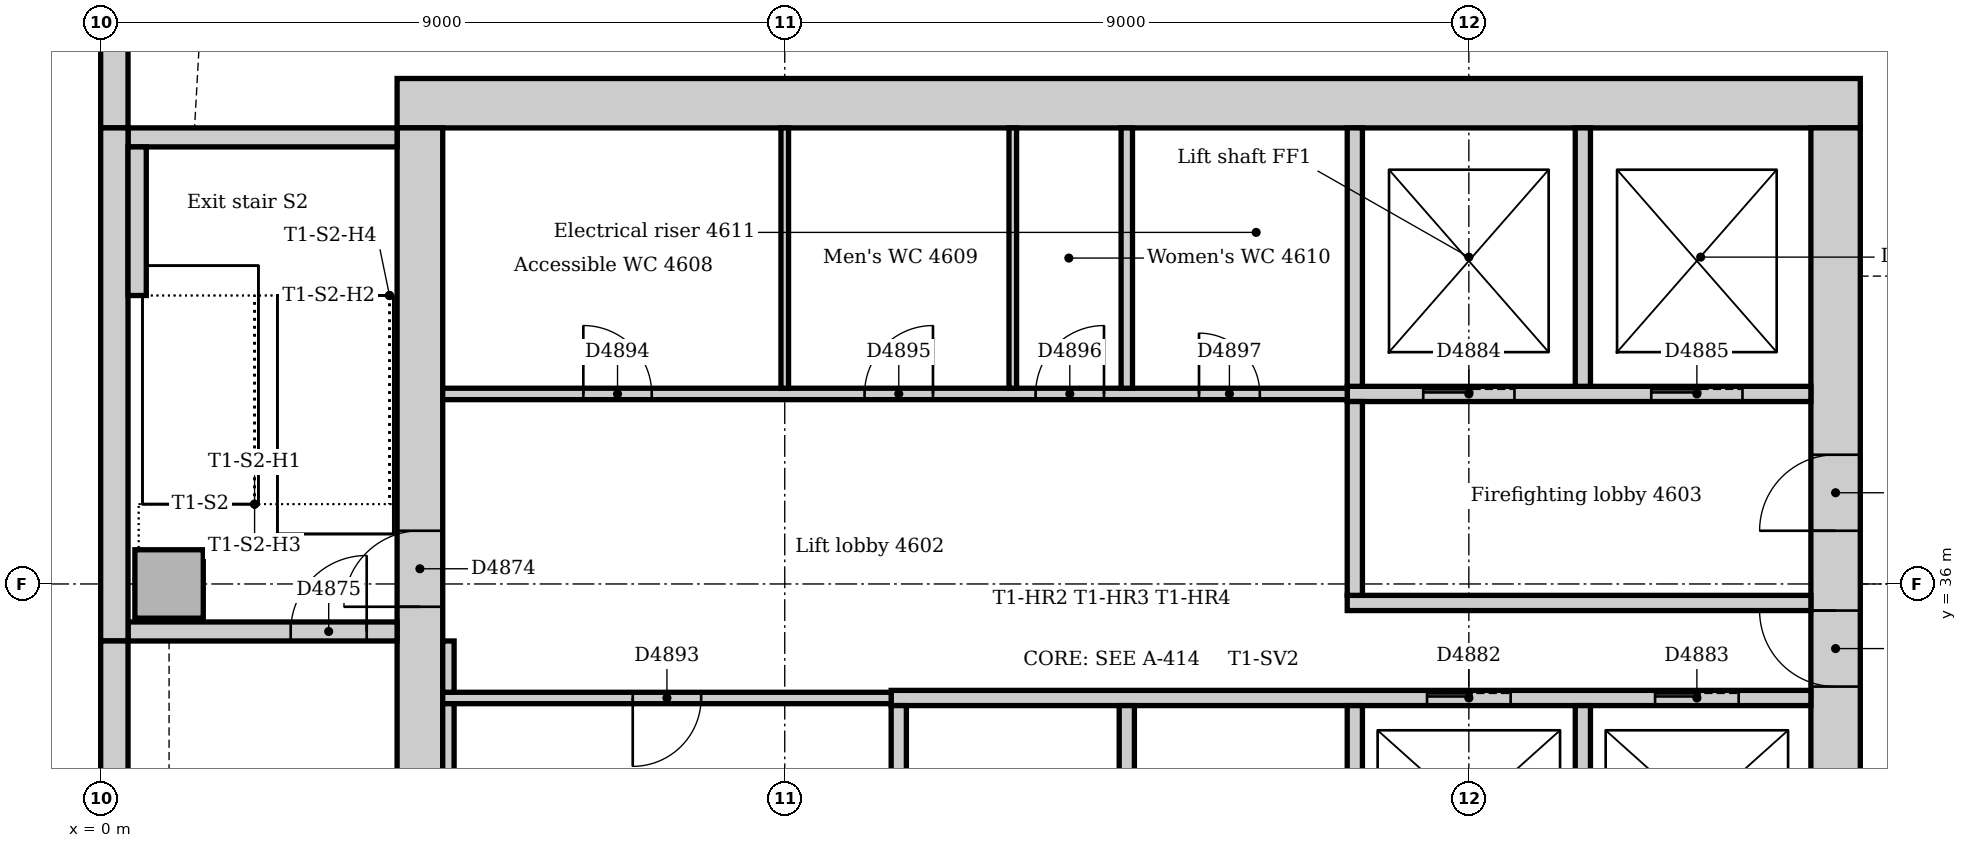
"""IFC4 building model, lengths in metres.
Left out: names, types, materials, properties, quantities, classifications, styles, units other than length and angle.
Written with IfcOpenShell. Run it as: python <this file> out.ifc"""

import sys

from ifc_helpers import new_model, si_unit, direction, frame, frame_2d, origin, origin_2d, place, context, subcontext, project, spatial, rectangle, extrude, element, fill, save


model = new_model("IFC4")
c1 = context("Model", 3, precision=1e-05, world=origin(), true_north=direction((0.0, 1.0)))
c2 = subcontext(c1, "Body", "Model", "MODEL_VIEW")
j1 = project(units=[si_unit("LENGTHUNIT", "METRE"), si_unit("PLANEANGLEUNIT", "RADIAN")], contexts=[c1])
p1 = place(None, origin())
s1 = spatial("IfcSite", under=j1, at=p1, CompositionType="ELEMENT")
p2 = place(p1, origin())
s2 = spatial("IfcBuilding", under=s1, at=p2, CompositionType="ELEMENT")
p3 = place(p2, frame((0.0, 0.0, 193.0)))
s3 = spatial("IfcBuildingStorey", under=s2, at=p3, CompositionType="ELEMENT", Elevation=193.0)
p4 = place(p3, frame((23.15, 42.325, 0.0), z_axis=(0.0, 0.0, 1.0), x_axis=(-1.0, 0.0, 0.0)))
e1 = element("IfcWall", 1, at=p4, inside=s3, PredefinedType="SOLIDWALL", context=c2, shape_type="SweptSolid", body=[
    extrude(rectangle(XDim=19.25, YDim=0.65, at=frame_2d((9.625, 0.0))), origin(), (0.0, 0.0, 1.0), 5.0),
])
p5 = place(p3, frame((22.825, 31.5, 0.0), z_axis=(0.0, 0.0, 1.0), x_axis=(0.0, 1.0, 0.0)))
e2 = element("IfcWall", 2, at=p5, inside=s3, PredefinedType="SOLIDWALL", context=c2, shape_type="SweptSolid", body=[
    extrude(rectangle(XDim=10.5, YDim=0.65, at=frame_2d((5.25, 0.0))), origin(), (0.0, 0.0, 1.0), 5.0),
])
p6 = place(p5, frame((3.15, 0.0, 0.0)))
e3 = element("IfcOpeningElement", 3, at=p6, cuts=e2, PredefinedType="OPENING", context=c2, shape_type="SweptSolid", body=[
    extrude(rectangle(XDim=1.0, YDim=2.1, at=frame_2d((0.5, 1.05))), frame((0.0, 0.335, 0.0), z_axis=(0.0, -1.0, 0.0), x_axis=(1.0, 0.0, 0.0)), (0.0, 0.0, 1.0), 0.67),
])
p7 = place(p5, frame((5.2, 0.0, 0.0)))
e4 = element("IfcOpeningElement", 4, at=p7, cuts=e2, PredefinedType="OPENING", context=c2, shape_type="SweptSolid", body=[
    extrude(rectangle(XDim=1.0, YDim=2.1, at=frame_2d((0.5, 1.05))), frame((0.0, 0.335, 0.0), z_axis=(0.0, -1.0, 0.0), x_axis=(1.0, 0.0, 0.0)), (0.0, 0.0, 1.0), 0.67),
])
p8 = place(p3, frame((4.2, 42.0, 0.0), z_axis=(0.0, 0.0, 1.0), x_axis=(0.0, -1.0, 0.0)))
e5 = element("IfcWall", 5, at=p8, inside=s3, PredefinedType="SOLIDWALL", context=c2, shape_type="SweptSolid", body=[
    extrude(rectangle(XDim=10.5, YDim=0.6, at=frame_2d((5.25, 0.0))), origin(), (0.0, 0.0, 1.0), 5.0),
])
p9 = place(p8, frame((5.3, 0.0, 0.0)))
e6 = element("IfcOpeningElement", 6, at=p9, cuts=e5, PredefinedType="OPENING", context=c2, shape_type="SweptSolid", body=[
    extrude(rectangle(XDim=1.0, YDim=2.1, at=frame_2d((0.5, 1.05))), frame((0.0, 0.31, 0.0), z_axis=(0.0, -1.0, 0.0), x_axis=(1.0, 0.0, 0.0)), (0.0, 0.0, 1.0), 0.62),
])
p10 = place(p3, frame((0.36, 35.375, 0.0), z_axis=(0.0, 0.0, 1.0), x_axis=(1.0, 0.0, 0.0)))
e7 = element("IfcWall", 7, at=p10, inside=s3, PredefinedType="SOLIDWALL", context=c2, shape_type="SweptSolid", body=[
    extrude(rectangle(XDim=3.54, YDim=0.25, at=frame_2d((1.77, 0.0))), origin(), (0.0, 0.0, 1.0), 5.0),
])
p11 = place(p10, frame((2.14, 0.0, 0.0)))
e8 = element("IfcOpeningElement", 8, at=p11, cuts=e7, PredefinedType="OPENING", context=c2, shape_type="SweptSolid", body=[
    extrude(rectangle(XDim=1.0, YDim=2.1, at=frame_2d((0.5, 1.05))), frame((0.0, 0.135, 0.0), z_axis=(0.0, -1.0, 0.0), x_axis=(1.0, 0.0, 0.0)), (0.0, 0.0, 1.0), 0.27),
])
p12 = place(p3, frame((3.9, 41.875, 0.0), z_axis=(0.0, 0.0, 1.0), x_axis=(-1.0, 0.0, 0.0)))
e9 = element("IfcWall", 9, at=p12, inside=s3, PredefinedType="SOLIDWALL", context=c2, shape_type="SweptSolid", body=[
    extrude(rectangle(XDim=3.54, YDim=0.25, at=frame_2d((1.77, 0.0))), origin(), (0.0, 0.0, 1.0), 5.0),
])
p13 = place(p3, frame((0.9, 36.0, 0.0), z_axis=(0.0, 0.0, 1.0), x_axis=(1.0, 0.0, 0.0)))
e10 = element("IfcColumn", 10, at=p13, inside=s3, PredefinedType="COLUMN", context=c2, shape_type="SweptSolid", body=[
    extrude(rectangle(XDim=0.9, YDim=0.9, at=origin_2d()), origin(), (0.0, 0.0, 1.0), 5.0),
])
p14 = place(p3, frame((0.18, 49.757, 0.0), z_axis=(0.0, 0.0, 1.0), x_axis=(0.0, -1.0, 0.0)))
e11 = element("IfcWall", 11, at=p14, inside=s3, PredefinedType="STANDARD", context=c2, shape_type="SweptSolid", body=[
    extrude(rectangle(XDim=7.757, YDim=0.36, at=frame_2d((3.879, 0.0))), origin(), (0.0, 0.0, 1.0), 4.85),
])
p15 = place(p14, frame((3.107, 0.0, 0.9)))
e12 = element("IfcOpeningElement", 12, at=p15, cuts=e11, PredefinedType="OPENING", context=c2, shape_type="SweptSolid", body=[
    extrude(rectangle(XDim=3.3, YDim=2.2, at=frame_2d((1.65, 1.1))), frame((0.0, 0.19, 0.0), z_axis=(0.0, -1.0, 0.0), x_axis=(1.0, 0.0, 0.0)), (0.0, 0.0, 1.0), 0.38),
])
p16 = place(p3, frame((0.18, 42.0, 0.0), z_axis=(0.0, 0.0, 1.0), x_axis=(0.0, -1.0, 0.0)))
e13 = element("IfcWall", 13, at=p16, inside=s3, PredefinedType="STANDARD", context=c2, shape_type="SweptSolid", body=[
    extrude(rectangle(XDim=6.75, YDim=0.36, at=frame_2d((3.375, 0.0))), origin(), (0.0, 0.0, 1.0), 4.85),
])
p17 = place(p3, frame((0.18, 35.25, 0.0), z_axis=(0.0, 0.0, 1.0), x_axis=(0.0, -1.0, 0.0)))
e14 = element("IfcWall", 14, at=p17, inside=s3, PredefinedType="STANDARD", context=c2, shape_type="SweptSolid", body=[
    extrude(rectangle(XDim=7.5, YDim=0.36, at=frame_2d((3.75, 0.0))), origin(), (0.0, 0.0, 1.0), 4.85),
])
p18 = place(p3, frame((0.48, 39.795, 0.0), z_axis=(0.0, 0.0, 1.0), x_axis=(0.0, 1.0, 0.0)))
e15 = element("IfcWall", 15, at=p18, inside=s3, PredefinedType="STANDARD", context=c2, shape_type="SweptSolid", body=[
    extrude(rectangle(XDim=1.955, YDim=0.24, at=frame_2d((0.978, 0.0))), origin(), (0.0, 0.0, 1.0), 5.0),
])
p19 = place(p3, frame((16.4, 35.75, 0.0), z_axis=(0.0, 0.0, 1.0), x_axis=(1.0, 0.0, 0.0)))
e16 = element("IfcWall", 16, at=p19, inside=s3, PredefinedType="PARTITIONING", context=c2, shape_type="SweptSolid", body=[
    extrude(rectangle(XDim=6.1, YDim=0.2, at=frame_2d((3.05, 0.0))), origin(), (0.0, 0.0, 1.0), 4.85),
])
p20 = place(p3, frame((16.4, 38.5, 0.0), z_axis=(0.0, 0.0, 1.0), x_axis=(1.0, 0.0, 0.0)))
e17 = element("IfcWall", 17, at=p20, inside=s3, PredefinedType="PARTITIONING", context=c2, shape_type="SweptSolid", body=[
    extrude(rectangle(XDim=6.1, YDim=0.2, at=frame_2d((3.05, 0.0))), origin(), (0.0, 0.0, 1.0), 4.85),
])
p21 = place(p20, frame((1.0, 0.0, 0.0)))
e18 = element("IfcOpeningElement", 18, at=p21, cuts=e17, PredefinedType="OPENING", context=c2, shape_type="SweptSolid", body=[
    extrude(rectangle(XDim=1.2, YDim=2.1, at=frame_2d((0.6, 1.05))), frame((0.0, 0.11, 0.0), z_axis=(0.0, -1.0, 0.0), x_axis=(1.0, 0.0, 0.0)), (0.0, 0.0, 1.0), 0.22),
])
p22 = place(p20, frame((4.0, 0.0, 0.0)))
e19 = element("IfcOpeningElement", 19, at=p22, cuts=e17, PredefinedType="OPENING", context=c2, shape_type="SweptSolid", body=[
    extrude(rectangle(XDim=1.2, YDim=2.1, at=frame_2d((0.6, 1.05))), frame((0.0, 0.11, 0.0), z_axis=(0.0, -1.0, 0.0), x_axis=(1.0, 0.0, 0.0)), (0.0, 0.0, 1.0), 0.22),
])
p23 = place(p3, frame((16.5, 35.85, 0.0), z_axis=(0.0, 0.0, 1.0), x_axis=(0.0, 1.0, 0.0)))
e20 = element("IfcWall", 20, at=p23, inside=s3, PredefinedType="PARTITIONING", context=c2, shape_type="SweptSolid", body=[
    extrude(rectangle(XDim=2.55, YDim=0.2, at=frame_2d((1.275, 0.0))), origin(), (0.0, 0.0, 1.0), 4.85),
])
p24 = place(p3, frame((10.4, 34.5, 0.0), z_axis=(0.0, 0.0, 1.0), x_axis=(1.0, 0.0, 0.0)))
e21 = element("IfcWall", 21, at=p24, inside=s3, PredefinedType="PARTITIONING", context=c2, shape_type="SweptSolid", body=[
    extrude(rectangle(XDim=12.1, YDim=0.2, at=frame_2d((6.05, 0.0))), origin(), (0.0, 0.0, 1.0), 4.85),
])
p25 = place(p24, frame((7.05, 0.0, 0.0)))
e22 = element("IfcOpeningElement", 22, at=p25, cuts=e21, PredefinedType="OPENING", context=c2, shape_type="SweptSolid", body=[
    extrude(rectangle(XDim=1.1, YDim=2.1, at=frame_2d((0.55, 1.05))), frame((0.0, 0.11, 0.0), z_axis=(0.0, -1.0, 0.0), x_axis=(1.0, 0.0, 0.0)), (0.0, 0.0, 1.0), 0.22),
])
p26 = place(p24, frame((10.05, 0.0, 0.0)))
e23 = element("IfcOpeningElement", 23, at=p26, cuts=e21, PredefinedType="OPENING", context=c2, shape_type="SweptSolid", body=[
    extrude(rectangle(XDim=1.1, YDim=2.1, at=frame_2d((0.55, 1.05))), frame((0.0, 0.11, 0.0), z_axis=(0.0, -1.0, 0.0), x_axis=(1.0, 0.0, 0.0)), (0.0, 0.0, 1.0), 0.22),
])
for number, where, z_axis, x_axis in (
    (24, (10.5, 31.75, 0.0), (0.0, 0.0, 1.0), (0.0, 1.0, 0.0)),
    (25, (13.5, 31.75, 0.0), (0.0, 0.0, 1.0), (0.0, 1.0, 0.0)),
    (26, (16.5, 31.75, 0.0), (0.0, 0.0, 1.0), (0.0, 1.0, 0.0)),
    (27, (19.5, 31.75, 0.0), (0.0, 0.0, 1.0), (0.0, 1.0, 0.0)),
):
    element("IfcWall", number, at=place(p3, frame(where, z_axis=z_axis, x_axis=x_axis)), inside=s3, PredefinedType="PARTITIONING", context=c2, shape_type="SweptSolid", body=[
        extrude(rectangle(XDim=2.65, YDim=0.2, at=frame_2d((1.325, 0.0))), origin(), (0.0, 0.0, 1.0), 4.85),
    ])
for number, where, z_axis, x_axis in (
    (28, (16.5, 38.6, 0.0), (0.0, 0.0, 1.0), (0.0, 1.0, 0.0)),
    (29, (19.5, 38.6, 0.0), (0.0, 0.0, 1.0), (0.0, 1.0, 0.0)),
):
    element("IfcWall", number, at=place(p3, frame(where, z_axis=z_axis, x_axis=x_axis)), inside=s3, PredefinedType="PARTITIONING", context=c2, shape_type="SweptSolid", body=[
        extrude(rectangle(XDim=3.4, YDim=0.2, at=frame_2d((1.7, 0.0))), origin(), (0.0, 0.0, 1.0), 4.85),
    ])
p27 = place(p3, frame((4.5, 38.5, 0.0), z_axis=(0.0, 0.0, 1.0), x_axis=(1.0, 0.0, 0.0)))
e30 = element("IfcWall", 30, at=p27, inside=s3, PredefinedType="PARTITIONING", context=c2, shape_type="SweptSolid", body=[
    extrude(rectangle(XDim=11.9, YDim=0.15, at=frame_2d((5.95, 0.0))), origin(), (0.0, 0.0, 1.0), 4.85),
])
p28 = place(p27, frame((1.85, 0.0, 0.0)))
e31 = element("IfcOpeningElement", 31, at=p28, cuts=e30, PredefinedType="OPENING", context=c2, shape_type="SweptSolid", body=[
    extrude(rectangle(XDim=0.9, YDim=2.1, at=frame_2d((0.45, 1.05))), frame((0.0, 0.085, 0.0), z_axis=(0.0, -1.0, 0.0), x_axis=(1.0, 0.0, 0.0)), (0.0, 0.0, 1.0), 0.17),
])
p29 = place(p27, frame((5.55, 0.0, 0.0)))
e32 = element("IfcOpeningElement", 32, at=p29, cuts=e30, PredefinedType="OPENING", context=c2, shape_type="SweptSolid", body=[
    extrude(rectangle(XDim=0.9, YDim=2.1, at=frame_2d((0.45, 1.05))), frame((0.0, 0.085, 0.0), z_axis=(0.0, -1.0, 0.0), x_axis=(1.0, 0.0, 0.0)), (0.0, 0.0, 1.0), 0.17),
])
p30 = place(p27, frame((7.8, 0.0, 0.0)))
e33 = element("IfcOpeningElement", 33, at=p30, cuts=e30, PredefinedType="OPENING", context=c2, shape_type="SweptSolid", body=[
    extrude(rectangle(XDim=0.9, YDim=2.1, at=frame_2d((0.45, 1.05))), frame((0.0, 0.085, 0.0), z_axis=(0.0, -1.0, 0.0), x_axis=(1.0, 0.0, 0.0)), (0.0, 0.0, 1.0), 0.17),
])
p31 = place(p27, frame((9.95, 0.0, 0.0)))
e34 = element("IfcOpeningElement", 34, at=p31, cuts=e30, PredefinedType="OPENING", context=c2, shape_type="SweptSolid", body=[
    extrude(rectangle(XDim=0.8, YDim=2.1, at=frame_2d((0.4, 1.05))), frame((0.0, 0.085, 0.0), z_axis=(0.0, -1.0, 0.0), x_axis=(1.0, 0.0, 0.0)), (0.0, 0.0, 1.0), 0.17),
])
p32 = place(p3, frame((4.5, 34.5, 0.0), z_axis=(0.0, 0.0, 1.0), x_axis=(1.0, 0.0, 0.0)))
e35 = element("IfcWall", 35, at=p32, inside=s3, PredefinedType="PARTITIONING", context=c2, shape_type="SweptSolid", body=[
    extrude(rectangle(XDim=5.9, YDim=0.15, at=frame_2d((2.95, 0.0))), origin(), (0.0, 0.0, 1.0), 4.85),
])
p33 = place(p32, frame((2.5, 0.0, 0.0)))
e36 = element("IfcOpeningElement", 36, at=p33, cuts=e35, PredefinedType="OPENING", context=c2, shape_type="SweptSolid", body=[
    extrude(rectangle(XDim=0.9, YDim=2.1, at=frame_2d((0.45, 1.05))), frame((0.0, 0.085, 0.0), z_axis=(0.0, -1.0, 0.0), x_axis=(1.0, 0.0, 0.0)), (0.0, 0.0, 1.0), 0.17),
])
p34 = place(p3, frame((4.575, 34.575, 0.0), z_axis=(0.0, 0.0, 1.0), x_axis=(0.0, 1.0, 0.0)))
e37 = element("IfcWall", 37, at=p34, inside=s3, PredefinedType="PARTITIONING", context=c2, shape_type="SweptSolid", body=[
    extrude(rectangle(XDim=0.675, YDim=0.15, at=frame_2d((0.338, 0.0))), origin(), (0.0, 0.0, 1.0), 4.85),
])
p35 = place(p3, frame((4.575, 31.75, 0.0), z_axis=(0.0, 0.0, 1.0), x_axis=(0.0, 1.0, 0.0)))
e38 = element("IfcWall", 38, at=p35, inside=s3, PredefinedType="PARTITIONING", context=c2, shape_type="SweptSolid", body=[
    extrude(rectangle(XDim=2.675, YDim=0.15, at=frame_2d((1.337, 0.0))), origin(), (0.0, 0.0, 1.0), 4.85),
])
p36 = place(p3, frame((13.5, 38.575, 0.0), z_axis=(0.0, 0.0, 1.0), x_axis=(0.0, 1.0, 0.0)))
e39 = element("IfcWall", 39, at=p36, inside=s3, PredefinedType="PARTITIONING", context=c2, shape_type="SweptSolid", body=[
    extrude(rectangle(XDim=3.425, YDim=0.15, at=frame_2d((1.712, 0.0))), origin(), (0.0, 0.0, 1.0), 4.85),
])
for number, where, z_axis, x_axis in (
    (40, (9.0, 38.575, 0.0), (0.0, 0.0, 1.0), (0.0, 1.0, 0.0)),
    (41, (12.0, 38.575, 0.0), (0.0, 0.0, 1.0), (0.0, 1.0, 0.0)),
):
    element("IfcWall", number, at=place(p3, frame(where, z_axis=z_axis, x_axis=x_axis)), inside=s3, PredefinedType="PARTITIONING", context=c2, shape_type="SweptSolid", body=[
        extrude(rectangle(XDim=3.425, YDim=0.1, at=frame_2d((1.712, 0.0))), origin(), (0.0, 0.0, 1.0), 4.85),
    ])
p37 = place(p9, frame((1.0, 0.0, 0.0), z_axis=(0.0, 0.0, 1.0), x_axis=(-1.0, 0.0, 0.0)))
e42 = element("IfcDoor", 42, at=p37, inside=s3, OperationType="SINGLE_SWING_LEFT", PredefinedType="DOOR", context=c2, shape_type="SweptSolid", body=[
    extrude(rectangle(XDim=1.0, YDim=2.1, at=frame_2d((0.5, 1.05))), frame((0.0, 0.025, 0.0), z_axis=(0.0, -1.0, 0.0), x_axis=(1.0, 0.0, 0.0)), (0.0, 0.0, 1.0), 0.05),
])
fill(e6, e42)
p38 = place(p11, origin())
e43 = element("IfcDoor", 43, at=p38, inside=s3, OperationType="SINGLE_SWING_RIGHT", PredefinedType="DOOR", context=c2, shape_type="SweptSolid", body=[
    extrude(rectangle(XDim=1.0, YDim=2.1, at=frame_2d((0.5, 1.05))), frame((0.0, 0.025, 0.0), z_axis=(0.0, -1.0, 0.0), x_axis=(1.0, 0.0, 0.0)), (0.0, 0.0, 1.0), 0.05),
])
fill(e8, e43)
p39 = place(p25, origin())
e44 = element("IfcDoor", 44, at=p39, inside=s3, OperationType="SLIDING_TO_LEFT", PredefinedType="DOOR", context=c2, shape_type="SweptSolid", body=[
    extrude(rectangle(XDim=1.1, YDim=2.1, at=frame_2d((0.55, 1.05))), frame((0.0, 0.025, 0.0), z_axis=(0.0, -1.0, 0.0), x_axis=(1.0, 0.0, 0.0)), (0.0, 0.0, 1.0), 0.05),
])
fill(e22, e44)
p40 = place(p26, origin())
e45 = element("IfcDoor", 45, at=p40, inside=s3, OperationType="SLIDING_TO_LEFT", PredefinedType="DOOR", context=c2, shape_type="SweptSolid", body=[
    extrude(rectangle(XDim=1.1, YDim=2.1, at=frame_2d((0.55, 1.05))), frame((0.0, 0.025, 0.0), z_axis=(0.0, -1.0, 0.0), x_axis=(1.0, 0.0, 0.0)), (0.0, 0.0, 1.0), 0.05),
])
fill(e23, e45)
p41 = place(p21, origin())
e46 = element("IfcDoor", 46, at=p41, inside=s3, OperationType="SLIDING_TO_LEFT", PredefinedType="DOOR", context=c2, shape_type="SweptSolid", body=[
    extrude(rectangle(XDim=1.2, YDim=2.1, at=frame_2d((0.6, 1.05))), frame((0.0, 0.025, 0.0), z_axis=(0.0, -1.0, 0.0), x_axis=(1.0, 0.0, 0.0)), (0.0, 0.0, 1.0), 0.05),
])
fill(e18, e46)
p42 = place(p22, origin())
e47 = element("IfcDoor", 47, at=p42, inside=s3, OperationType="SLIDING_TO_LEFT", PredefinedType="DOOR", context=c2, shape_type="SweptSolid", body=[
    extrude(rectangle(XDim=1.2, YDim=2.1, at=frame_2d((0.6, 1.05))), frame((0.0, 0.025, 0.0), z_axis=(0.0, -1.0, 0.0), x_axis=(1.0, 0.0, 0.0)), (0.0, 0.0, 1.0), 0.05),
])
fill(e19, e47)
p43 = place(p6, origin())
e48 = element("IfcDoor", 48, at=p43, inside=s3, OperationType="SINGLE_SWING_RIGHT", PredefinedType="DOOR", context=c2, shape_type="SweptSolid", body=[
    extrude(rectangle(XDim=1.0, YDim=2.1, at=frame_2d((0.5, 1.05))), frame((0.0, 0.025, 0.0), z_axis=(0.0, -1.0, 0.0), x_axis=(1.0, 0.0, 0.0)), (0.0, 0.0, 1.0), 0.05),
])
fill(e3, e48)
p44 = place(p7, origin())
e49 = element("IfcDoor", 49, at=p44, inside=s3, OperationType="SINGLE_SWING_LEFT", PredefinedType="DOOR", context=c2, shape_type="SweptSolid", body=[
    extrude(rectangle(XDim=1.0, YDim=2.1, at=frame_2d((0.5, 1.05))), frame((0.0, 0.025, 0.0), z_axis=(0.0, -1.0, 0.0), x_axis=(1.0, 0.0, 0.0)), (0.0, 0.0, 1.0), 0.05),
])
fill(e4, e49)
p45 = place(p33, frame((0.9, 0.0, 0.0), z_axis=(0.0, 0.0, 1.0), x_axis=(-1.0, 0.0, 0.0)))
e50 = element("IfcDoor", 50, at=p45, inside=s3, OperationType="SINGLE_SWING_RIGHT", PredefinedType="DOOR", context=c2, shape_type="SweptSolid", body=[
    extrude(rectangle(XDim=0.9, YDim=2.1, at=frame_2d((0.45, 1.05))), frame((0.0, 0.025, 0.0), z_axis=(0.0, -1.0, 0.0), x_axis=(1.0, 0.0, 0.0)), (0.0, 0.0, 1.0), 0.05),
])
fill(e36, e50)
p46 = place(p28, origin())
e51 = element("IfcDoor", 51, at=p46, inside=s3, OperationType="SINGLE_SWING_LEFT", PredefinedType="DOOR", context=c2, shape_type="SweptSolid", body=[
    extrude(rectangle(XDim=0.9, YDim=2.1, at=frame_2d((0.45, 1.05))), frame((0.0, 0.025, 0.0), z_axis=(0.0, -1.0, 0.0), x_axis=(1.0, 0.0, 0.0)), (0.0, 0.0, 1.0), 0.05),
])
fill(e31, e51)
p47 = place(p29, origin())
e52 = element("IfcDoor", 52, at=p47, inside=s3, OperationType="SINGLE_SWING_RIGHT", PredefinedType="DOOR", context=c2, shape_type="SweptSolid", body=[
    extrude(rectangle(XDim=0.9, YDim=2.1, at=frame_2d((0.45, 1.05))), frame((0.0, 0.025, 0.0), z_axis=(0.0, -1.0, 0.0), x_axis=(1.0, 0.0, 0.0)), (0.0, 0.0, 1.0), 0.05),
])
fill(e32, e52)
p48 = place(p30, origin())
e53 = element("IfcDoor", 53, at=p48, inside=s3, OperationType="SINGLE_SWING_RIGHT", PredefinedType="DOOR", context=c2, shape_type="SweptSolid", body=[
    extrude(rectangle(XDim=0.9, YDim=2.1, at=frame_2d((0.45, 1.05))), frame((0.0, 0.025, 0.0), z_axis=(0.0, -1.0, 0.0), x_axis=(1.0, 0.0, 0.0)), (0.0, 0.0, 1.0), 0.05),
])
fill(e33, e53)
p49 = place(p31, origin())
e54 = element("IfcDoor", 54, at=p49, inside=s3, OperationType="SINGLE_SWING_LEFT", PredefinedType="DOOR", context=c2, shape_type="SweptSolid", body=[
    extrude(rectangle(XDim=0.8, YDim=2.1, at=frame_2d((0.4, 1.05))), frame((0.0, 0.025, 0.0), z_axis=(0.0, -1.0, 0.0), x_axis=(1.0, 0.0, 0.0)), (0.0, 0.0, 1.0), 0.05),
])
fill(e34, e54)
save(model, sys.argv[1])
